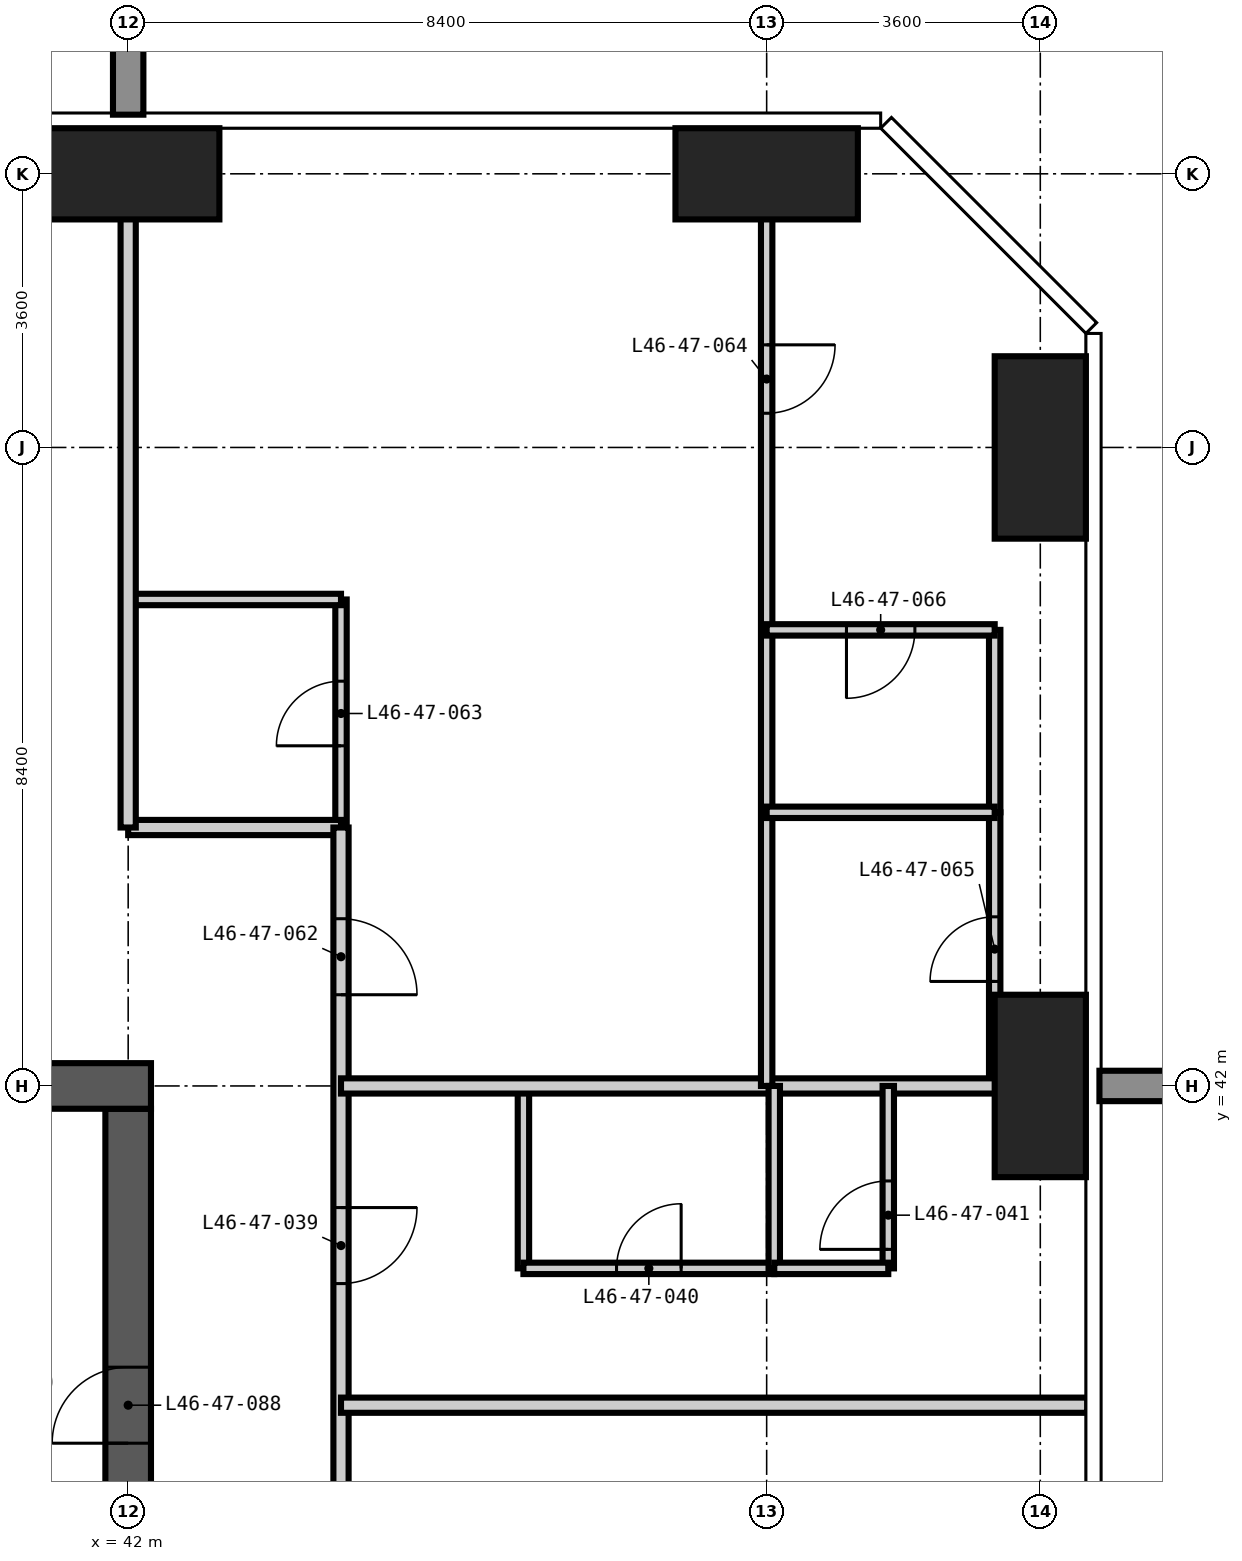
"""IFC4 building model, lengths in metres.
Left out: names, types, materials, properties, quantities, classifications, styles, units other than length and angle.
Written with IfcOpenShell. Run it as: python <this file> out.ifc"""

import sys

from ifc_helpers import new_model, si_unit, direction, frame, frame_2d, origin, origin_2d, place, context, subcontext, project, spatial, rectangle, extrude, element, fill, save


model = new_model("IFC4")
c1 = context("Model", 3, precision=1e-05, world=origin(), true_north=direction((0.0, 1.0)))
c2 = subcontext(c1, "Body", "Model", "MODEL_VIEW")
j1 = project(units=[si_unit("LENGTHUNIT", "METRE"), si_unit("PLANEANGLEUNIT", "RADIAN")], contexts=[c1])
p1 = place(None, origin())
s1 = spatial("IfcSite", under=j1, at=p1, CompositionType="ELEMENT")
p2 = place(p1, origin())
s2 = spatial("IfcBuilding", under=s1, at=p2, CompositionType="ELEMENT")
p3 = place(p2, frame((0.0, 0.0, 180.6)))
s3 = spatial("IfcBuildingStorey", under=s2, at=p3, CompositionType="ELEMENT", Elevation=180.6)
for number, where, z_axis, x_axis in (
    (1, (42.0, 54.0, -0.35), (0.0, 0.0, 1.0), (1.0, 0.0, 0.0)),
    (2, (50.4, 54.0, -0.35), (0.0, 0.0, 1.0), (1.0, 0.0, 0.0)),
):
    element("IfcColumn", number, at=place(p3, frame(where, z_axis=z_axis, x_axis=x_axis)), inside=s3, PredefinedType="COLUMN", context=c2, shape_type="SweptSolid", body=[
        extrude(rectangle(XDim=2.4, YDim=1.2, at=origin_2d()), origin(), (0.0, 0.0, 1.0), 3.6),
    ])
for number, where, z_axis, x_axis in (
    (3, (54.0, 42.0, -0.35), (0.0, 0.0, 1.0), (1.0, 0.0, 0.0)),
    (4, (54.0, 50.4, -0.35), (0.0, 0.0, 1.0), (1.0, 0.0, 0.0)),
):
    element("IfcColumn", number, at=place(p3, frame(where, z_axis=z_axis, x_axis=x_axis)), inside=s3, PredefinedType="COLUMN", context=c2, shape_type="SweptSolid", body=[
        extrude(rectangle(XDim=1.2, YDim=2.4, at=origin_2d()), origin(), (0.0, 0.0, 1.0), 3.6),
    ])
p4 = place(p3, frame((42.0, 17.1, -0.35), z_axis=(0.0, 0.0, 1.0), x_axis=(0.0, 1.0, 0.0)))
e5 = element("IfcWall", 5, at=p4, inside=s3, PredefinedType="SHEAR", context=c2, shape_type="SweptSolid", body=[
    extrude(rectangle(XDim=24.6, YDim=0.6, at=frame_2d((12.3, 0.0))), origin(), (0.0, 0.0, 1.0), 3.6),
])
p5 = place(p4, frame((0.5, 0.0, 0.35)))
e6 = element("IfcOpeningElement", 6, at=p5, cuts=e5, PredefinedType="OPENING", context=c2, shape_type="SweptSolid", body=[
    extrude(rectangle(XDim=1.2, YDim=2.2, at=frame_2d((0.6, 1.1))), frame((0.0, 0.31, 0.0), z_axis=(0.0, -1.0, 0.0), x_axis=(1.0, 0.0, 0.0)), (0.0, 0.0, 1.0), 0.62),
])
p6 = place(p4, frame((11.8, 0.0, 0.35)))
e7 = element("IfcOpeningElement", 7, at=p6, cuts=e5, PredefinedType="OPENING", context=c2, shape_type="SweptSolid", body=[
    extrude(rectangle(XDim=1.0, YDim=2.1, at=frame_2d((0.5, 1.05))), frame((0.0, 0.31, 0.0), z_axis=(0.0, -1.0, 0.0), x_axis=(1.0, 0.0, 0.0)), (0.0, 0.0, 1.0), 0.62),
])
p7 = place(p4, frame((20.2, 0.0, 0.35)))
e8 = element("IfcOpeningElement", 8, at=p7, cuts=e5, PredefinedType="OPENING", context=c2, shape_type="SweptSolid", body=[
    extrude(rectangle(XDim=1.0, YDim=2.1, at=frame_2d((0.5, 1.05))), frame((0.0, 0.31, 0.0), z_axis=(0.0, -1.0, 0.0), x_axis=(1.0, 0.0, 0.0)), (0.0, 0.0, 1.0), 0.62),
])
p8 = place(p3, frame((42.3, 42.0, -0.35), z_axis=(0.0, 0.0, 1.0), x_axis=(-1.0, 0.0, 0.0)))
e9 = element("IfcWall", 9, at=p8, inside=s3, PredefinedType="SHEAR", context=c2, shape_type="SweptSolid", body=[
    extrude(rectangle(XDim=25.8, YDim=0.6, at=frame_2d((12.9, 0.0))), origin(), (0.0, 0.0, 1.0), 3.6),
])
p9 = place(p8, frame((20.8, 0.0, 0.35)))
e10 = element("IfcOpeningElement", 10, at=p9, cuts=e9, PredefinedType="OPENING", context=c2, shape_type="SweptSolid", body=[
    extrude(rectangle(XDim=1.0, YDim=2.1, at=frame_2d((0.5, 1.05))), frame((0.0, 0.31, 0.0), z_axis=(0.0, -1.0, 0.0), x_axis=(1.0, 0.0, 0.0)), (0.0, 0.0, 1.0), 0.62),
])
p10 = place(p8, frame((10.2, 0.0, 0.35)))
e11 = element("IfcOpeningElement", 11, at=p10, cuts=e9, PredefinedType="OPENING", context=c2, shape_type="SweptSolid", body=[
    extrude(rectangle(XDim=1.2, YDim=2.2, at=frame_2d((0.6, 1.1))), frame((0.0, 0.31, 0.0), z_axis=(0.0, -1.0, 0.0), x_axis=(1.0, 0.0, 0.0)), (0.0, 0.0, 1.0), 0.62),
])
p11 = place(p3, frame((44.8, 45.4, 0.0), z_axis=(0.0, 0.0, 1.0), x_axis=(0.0, 1.0, 0.0)))
e12 = element("IfcWall", 12, at=p11, inside=s3, PredefinedType="PARTITIONING", context=c2, shape_type="SweptSolid", body=[
    extrude(rectangle(XDim=3.0, YDim=0.15, at=frame_2d((1.5, 0.0))), origin(), (0.0, 0.0, 1.0), 3.25),
])
p12 = place(p11, frame((1.075, 0.0, 0.0)))
e13 = element("IfcOpeningElement", 13, at=p12, cuts=e12, PredefinedType="OPENING", context=c2, shape_type="SweptSolid", body=[
    extrude(rectangle(XDim=0.85, YDim=2.1, at=frame_2d((0.425, 1.05))), frame((0.0, 0.085, 0.0), z_axis=(0.0, -1.0, 0.0), x_axis=(1.0, 0.0, 0.0)), (0.0, 0.0, 1.0), 0.17),
])
p13 = place(p3, frame((47.2, 39.6, 0.0), z_axis=(0.0, 0.0, 1.0), x_axis=(0.0, 1.0, 0.0)))
e14 = element("IfcWall", 14, at=p13, inside=s3, PredefinedType="PARTITIONING", context=c2, shape_type="SweptSolid", body=[
    extrude(rectangle(XDim=2.4, YDim=0.15, at=frame_2d((1.2, 0.0))), origin(), (0.0, 0.0, 1.0), 3.25),
])
p14 = place(p3, frame((53.4, 42.0, 0.0), z_axis=(0.0, 0.0, 1.0), x_axis=(0.0, 1.0, 0.0)))
e15 = element("IfcWall", 15, at=p14, inside=s3, PredefinedType="PARTITIONING", context=c2, shape_type="SweptSolid", body=[
    extrude(rectangle(XDim=3.6, YDim=0.15, at=frame_2d((1.8, 0.0))), origin(), (0.0, 0.0, 1.0), 3.25),
])
p15 = place(p14, frame((1.375, 0.0, 0.0)))
e16 = element("IfcOpeningElement", 16, at=p15, cuts=e15, PredefinedType="OPENING", context=c2, shape_type="SweptSolid", body=[
    extrude(rectangle(XDim=0.85, YDim=2.1, at=frame_2d((0.425, 1.05))), frame((0.0, 0.085, 0.0), z_axis=(0.0, -1.0, 0.0), x_axis=(1.0, 0.0, 0.0)), (0.0, 0.0, 1.0), 0.17),
])
p16 = place(p3, frame((47.2, 39.6, 0.0), z_axis=(0.0, 0.0, 1.0), x_axis=(1.0, 0.0, 0.0)))
e17 = element("IfcWall", 17, at=p16, inside=s3, PredefinedType="PARTITIONING", context=c2, shape_type="SweptSolid", body=[
    extrude(rectangle(XDim=3.3, YDim=0.15, at=frame_2d((1.65, 0.0))), origin(), (0.0, 0.0, 1.0), 3.25),
])
p17 = place(p16, frame((1.225, 0.0, 0.0)))
e18 = element("IfcOpeningElement", 18, at=p17, cuts=e17, PredefinedType="OPENING", context=c2, shape_type="SweptSolid", body=[
    extrude(rectangle(XDim=0.85, YDim=2.1, at=frame_2d((0.425, 1.05))), frame((0.0, 0.085, 0.0), z_axis=(0.0, -1.0, 0.0), x_axis=(1.0, 0.0, 0.0)), (0.0, 0.0, 1.0), 0.17),
])
p18 = place(p3, frame((42.0, 48.4, 0.0), z_axis=(0.0, 0.0, 1.0), x_axis=(1.0, 0.0, 0.0)))
e19 = element("IfcWall", 19, at=p18, inside=s3, PredefinedType="PARTITIONING", context=c2, shape_type="SweptSolid", body=[
    extrude(rectangle(XDim=2.8, YDim=0.15, at=frame_2d((1.4, 0.0))), origin(), (0.0, 0.0, 1.0), 3.25),
])
p19 = place(p3, frame((42.0, 45.4, 0.0), z_axis=(0.0, 0.0, 1.0), x_axis=(1.0, 0.0, 0.0)))
e20 = element("IfcWall", 20, at=p19, inside=s3, PredefinedType="PARTITIONING", context=c2, shape_type="SweptSolid", body=[
    extrude(rectangle(XDim=2.8, YDim=0.2, at=frame_2d((1.4, 0.0))), origin(), (0.0, 0.0, 1.0), 3.25),
])
p20 = place(p3, frame((42.0, 54.618, 0.0), z_axis=(0.0, 0.0, 1.0), x_axis=(0.0, -1.0, 0.0)))
e21 = element("IfcWall", 21, at=p20, inside=s3, PredefinedType="PARTITIONING", context=c2, shape_type="SweptSolid", body=[
    extrude(rectangle(XDim=9.218, YDim=0.2, at=frame_2d((4.609, 0.0))), origin(), (0.0, 0.0, 1.0), 3.25),
])
p21 = place(p3, frame((44.8, 45.4, 0.0), z_axis=(0.0, 0.0, 1.0), x_axis=(0.0, -1.0, 0.0)))
e22 = element("IfcWall", 22, at=p21, inside=s3, PredefinedType="PARTITIONING", context=c2, shape_type="SweptSolid", body=[
    extrude(rectangle(XDim=30.8, YDim=0.2, at=frame_2d((15.4, 0.0))), origin(), (0.0, 0.0, 1.0), 3.25),
])
p22 = place(p21, frame((26.0, 0.0, 0.0)))
e23 = element("IfcOpeningElement", 23, at=p22, cuts=e22, PredefinedType="OPENING", context=c2, shape_type="SweptSolid", body=[
    extrude(rectangle(XDim=1.0, YDim=2.2, at=frame_2d((0.5, 1.1))), frame((0.0, 0.11, 0.0), z_axis=(0.0, -1.0, 0.0), x_axis=(1.0, 0.0, 0.0)), (0.0, 0.0, 1.0), 0.22),
])
p23 = place(p21, frame((21.8, 0.0, 0.0)))
e24 = element("IfcOpeningElement", 24, at=p23, cuts=e22, PredefinedType="OPENING", context=c2, shape_type="SweptSolid", body=[
    extrude(rectangle(XDim=1.0, YDim=2.2, at=frame_2d((0.5, 1.1))), frame((0.0, 0.11, 0.0), z_axis=(0.0, -1.0, 0.0), x_axis=(1.0, 0.0, 0.0)), (0.0, 0.0, 1.0), 0.22),
])
p24 = place(p21, frame((17.6, 0.0, 0.0)))
e25 = element("IfcOpeningElement", 25, at=p24, cuts=e22, PredefinedType="OPENING", context=c2, shape_type="SweptSolid", body=[
    extrude(rectangle(XDim=1.0, YDim=2.2, at=frame_2d((0.5, 1.1))), frame((0.0, 0.11, 0.0), z_axis=(0.0, -1.0, 0.0), x_axis=(1.0, 0.0, 0.0)), (0.0, 0.0, 1.0), 0.22),
])
p25 = place(p21, frame((13.4, 0.0, 0.0)))
e26 = element("IfcOpeningElement", 26, at=p25, cuts=e22, PredefinedType="OPENING", context=c2, shape_type="SweptSolid", body=[
    extrude(rectangle(XDim=1.0, YDim=2.2, at=frame_2d((0.5, 1.1))), frame((0.0, 0.11, 0.0), z_axis=(0.0, -1.0, 0.0), x_axis=(1.0, 0.0, 0.0)), (0.0, 0.0, 1.0), 0.22),
])
p26 = place(p21, frame((9.2, 0.0, 0.0)))
e27 = element("IfcOpeningElement", 27, at=p26, cuts=e22, PredefinedType="OPENING", context=c2, shape_type="SweptSolid", body=[
    extrude(rectangle(XDim=1.0, YDim=2.2, at=frame_2d((0.5, 1.1))), frame((0.0, 0.11, 0.0), z_axis=(0.0, -1.0, 0.0), x_axis=(1.0, 0.0, 0.0)), (0.0, 0.0, 1.0), 0.22),
])
p27 = place(p21, frame((5.0, 0.0, 0.0)))
e28 = element("IfcOpeningElement", 28, at=p27, cuts=e22, PredefinedType="OPENING", context=c2, shape_type="SweptSolid", body=[
    extrude(rectangle(XDim=1.0, YDim=2.2, at=frame_2d((0.5, 1.1))), frame((0.0, 0.11, 0.0), z_axis=(0.0, -1.0, 0.0), x_axis=(1.0, 0.0, 0.0)), (0.0, 0.0, 1.0), 0.22),
])
p28 = place(p21, frame((29.2, 0.0, 0.0)))
e29 = element("IfcOpeningElement", 29, at=p28, cuts=e22, PredefinedType="OPENING", context=c2, shape_type="SweptSolid", body=[
    extrude(rectangle(XDim=1.0, YDim=2.2, at=frame_2d((0.5, 1.1))), frame((0.0, 0.11, 0.0), z_axis=(0.0, -1.0, 0.0), x_axis=(1.0, 0.0, 0.0)), (0.0, 0.0, 1.0), 0.22),
])
p29 = place(p21, frame((1.2, 0.0, 0.0)))
e30 = element("IfcOpeningElement", 30, at=p29, cuts=e22, PredefinedType="OPENING", context=c2, shape_type="SweptSolid", body=[
    extrude(rectangle(XDim=1.0, YDim=2.2, at=frame_2d((0.5, 1.1))), frame((0.0, 0.11, 0.0), z_axis=(0.0, -1.0, 0.0), x_axis=(1.0, 0.0, 0.0)), (0.0, 0.0, 1.0), 0.22),
])
for number, where, z_axis, x_axis in (
    (31, (44.8, 37.8, 0.0), (0.0, 0.0, 1.0), (1.0, 0.0, 0.0)),
    (32, (44.8, 42.0, 0.0), (0.0, 0.0, 1.0), (1.0, 0.0, 0.0)),
):
    element("IfcWall", number, at=place(p3, frame(where, z_axis=z_axis, x_axis=x_axis)), inside=s3, PredefinedType="PARTITIONING", context=c2, shape_type="SweptSolid", body=[
        extrude(rectangle(XDim=9.818, YDim=0.2, at=frame_2d((4.909, 0.0))), origin(), (0.0, 0.0, 1.0), 3.25),
    ])
p30 = place(p3, frame((50.4, 42.0, 0.0), z_axis=(0.0, 0.0, 1.0), x_axis=(0.0, 1.0, 0.0)))
e33 = element("IfcWall", 33, at=p30, inside=s3, PredefinedType="PARTITIONING", context=c2, shape_type="SweptSolid", body=[
    extrude(rectangle(XDim=12.618, YDim=0.15, at=frame_2d((6.309, 0.0))), origin(), (0.0, 0.0, 1.0), 3.25),
])
p31 = place(p30, frame((8.85, 0.0, 0.0)))
e34 = element("IfcOpeningElement", 34, at=p31, cuts=e33, PredefinedType="OPENING", context=c2, shape_type="SweptSolid", body=[
    extrude(rectangle(XDim=0.9, YDim=2.1, at=frame_2d((0.45, 1.05))), frame((0.0, 0.085, 0.0), z_axis=(0.0, -1.0, 0.0), x_axis=(1.0, 0.0, 0.0)), (0.0, 0.0, 1.0), 0.17),
])
p32 = place(p3, frame((50.5, 39.6, 0.0), z_axis=(0.0, 0.0, 1.0), x_axis=(0.0, 1.0, 0.0)))
e35 = element("IfcWall", 35, at=p32, inside=s3, PredefinedType="PARTITIONING", context=c2, shape_type="SweptSolid", body=[
    extrude(rectangle(XDim=2.4, YDim=0.15, at=frame_2d((1.2, 0.0))), origin(), (0.0, 0.0, 1.0), 3.25),
])
p33 = place(p3, frame((52.0, 39.6, 0.0), z_axis=(0.0, 0.0, 1.0), x_axis=(0.0, 1.0, 0.0)))
e36 = element("IfcWall", 36, at=p33, inside=s3, PredefinedType="PARTITIONING", context=c2, shape_type="SweptSolid", body=[
    extrude(rectangle(XDim=2.4, YDim=0.15, at=frame_2d((1.2, 0.0))), origin(), (0.0, 0.0, 1.0), 3.25),
])
p34 = place(p33, frame((0.25, 0.0, 0.0)))
e37 = element("IfcOpeningElement", 37, at=p34, cuts=e36, PredefinedType="OPENING", context=c2, shape_type="SweptSolid", body=[
    extrude(rectangle(XDim=0.9, YDim=2.1, at=frame_2d((0.45, 1.05))), frame((0.0, 0.085, 0.0), z_axis=(0.0, -1.0, 0.0), x_axis=(1.0, 0.0, 0.0)), (0.0, 0.0, 1.0), 0.17),
])
p35 = place(p3, frame((53.4, 45.6, 0.0), z_axis=(0.0, 0.0, 1.0), x_axis=(0.0, 1.0, 0.0)))
e38 = element("IfcWall", 38, at=p35, inside=s3, PredefinedType="PARTITIONING", context=c2, shape_type="SweptSolid", body=[
    extrude(rectangle(XDim=2.4, YDim=0.15, at=frame_2d((1.2, 0.0))), origin(), (0.0, 0.0, 1.0), 3.25),
])
p36 = place(p3, frame((50.5, 39.6, 0.0), z_axis=(0.0, 0.0, 1.0), x_axis=(1.0, 0.0, 0.0)))
e39 = element("IfcWall", 39, at=p36, inside=s3, PredefinedType="PARTITIONING", context=c2, shape_type="SweptSolid", body=[
    extrude(rectangle(XDim=1.5, YDim=0.15, at=frame_2d((0.75, 0.0))), origin(), (0.0, 0.0, 1.0), 3.25),
])
p37 = place(p3, frame((50.4, 45.6, 0.0), z_axis=(0.0, 0.0, 1.0), x_axis=(1.0, 0.0, 0.0)))
e40 = element("IfcWall", 40, at=p37, inside=s3, PredefinedType="PARTITIONING", context=c2, shape_type="SweptSolid", body=[
    extrude(rectangle(XDim=3.0, YDim=0.15, at=frame_2d((1.5, 0.0))), origin(), (0.0, 0.0, 1.0), 3.25),
])
p38 = place(p3, frame((50.4, 48.0, 0.0), z_axis=(0.0, 0.0, 1.0), x_axis=(1.0, 0.0, 0.0)))
e41 = element("IfcWall", 41, at=p38, inside=s3, PredefinedType="PARTITIONING", context=c2, shape_type="SweptSolid", body=[
    extrude(rectangle(XDim=3.0, YDim=0.15, at=frame_2d((1.5, 0.0))), origin(), (0.0, 0.0, 1.0), 3.25),
])
p39 = place(p38, frame((1.05, 0.0, 0.0)))
e42 = element("IfcOpeningElement", 42, at=p39, cuts=e41, PredefinedType="OPENING", context=c2, shape_type="SweptSolid", body=[
    extrude(rectangle(XDim=0.9, YDim=2.1, at=frame_2d((0.45, 1.05))), frame((0.0, 0.085, 0.0), z_axis=(0.0, -1.0, 0.0), x_axis=(1.0, 0.0, 0.0)), (0.0, 0.0, 1.0), 0.17),
])
p40 = place(p27, origin())
e43 = element("IfcDoor", 43, at=p40, inside=s3, OperationType="SINGLE_SWING_LEFT", PredefinedType="DOOR", context=c2, shape_type="SweptSolid", body=[
    extrude(rectangle(XDim=1.0, YDim=2.2, at=frame_2d((0.5, 1.1))), frame((0.0, 0.025, 0.0), z_axis=(0.0, -1.0, 0.0), x_axis=(1.0, 0.0, 0.0)), (0.0, 0.0, 1.0), 0.05),
])
fill(e28, e43)
p41 = place(p17, origin())
e44 = element("IfcDoor", 44, at=p41, inside=s3, OperationType="SINGLE_SWING_RIGHT", PredefinedType="DOOR", context=c2, shape_type="SweptSolid", body=[
    extrude(rectangle(XDim=0.85, YDim=2.1, at=frame_2d((0.425, 1.05))), frame((0.0, 0.025, 0.0), z_axis=(0.0, -1.0, 0.0), x_axis=(1.0, 0.0, 0.0)), (0.0, 0.0, 1.0), 0.05),
])
fill(e18, e44)
p42 = place(p34, origin())
e45 = element("IfcDoor", 45, at=p42, inside=s3, OperationType="SINGLE_SWING_LEFT", PredefinedType="DOOR", context=c2, shape_type="SweptSolid", body=[
    extrude(rectangle(XDim=0.9, YDim=2.1, at=frame_2d((0.45, 1.05))), frame((0.0, 0.025, 0.0), z_axis=(0.0, -1.0, 0.0), x_axis=(1.0, 0.0, 0.0)), (0.0, 0.0, 1.0), 0.05),
])
fill(e37, e45)
p43 = place(p29, origin())
e46 = element("IfcDoor", 46, at=p43, inside=s3, OperationType="SINGLE_SWING_RIGHT", PredefinedType="DOOR", context=c2, shape_type="SweptSolid", body=[
    extrude(rectangle(XDim=1.0, YDim=2.2, at=frame_2d((0.5, 1.1))), frame((0.0, 0.025, 0.0), z_axis=(0.0, -1.0, 0.0), x_axis=(1.0, 0.0, 0.0)), (0.0, 0.0, 1.0), 0.05),
])
fill(e30, e46)
p44 = place(p12, origin())
e47 = element("IfcDoor", 47, at=p44, inside=s3, OperationType="SINGLE_SWING_LEFT", PredefinedType="DOOR", context=c2, shape_type="SweptSolid", body=[
    extrude(rectangle(XDim=0.85, YDim=2.1, at=frame_2d((0.425, 1.05))), frame((0.0, 0.025, 0.0), z_axis=(0.0, -1.0, 0.0), x_axis=(1.0, 0.0, 0.0)), (0.0, 0.0, 1.0), 0.05),
])
fill(e13, e47)
p45 = place(p31, frame((0.9, 0.0, 0.0), z_axis=(0.0, 0.0, 1.0), x_axis=(-1.0, 0.0, 0.0)))
e48 = element("IfcDoor", 48, at=p45, inside=s3, OperationType="SINGLE_SWING_LEFT", PredefinedType="DOOR", context=c2, shape_type="SweptSolid", body=[
    extrude(rectangle(XDim=0.9, YDim=2.1, at=frame_2d((0.45, 1.05))), frame((0.0, 0.025, 0.0), z_axis=(0.0, -1.0, 0.0), x_axis=(1.0, 0.0, 0.0)), (0.0, 0.0, 1.0), 0.05),
])
fill(e34, e48)
p46 = place(p15, origin())
e49 = element("IfcDoor", 49, at=p46, inside=s3, OperationType="SINGLE_SWING_LEFT", PredefinedType="DOOR", context=c2, shape_type="SweptSolid", body=[
    extrude(rectangle(XDim=0.85, YDim=2.1, at=frame_2d((0.425, 1.05))), frame((0.0, 0.025, 0.0), z_axis=(0.0, -1.0, 0.0), x_axis=(1.0, 0.0, 0.0)), (0.0, 0.0, 1.0), 0.05),
])
fill(e16, e49)
p47 = place(p39, frame((0.9, 0.0, 0.0), z_axis=(0.0, 0.0, 1.0), x_axis=(-1.0, 0.0, 0.0)))
e50 = element("IfcDoor", 50, at=p47, inside=s3, OperationType="SINGLE_SWING_RIGHT", PredefinedType="DOOR", context=c2, shape_type="SweptSolid", body=[
    extrude(rectangle(XDim=0.9, YDim=2.1, at=frame_2d((0.45, 1.05))), frame((0.0, 0.025, 0.0), z_axis=(0.0, -1.0, 0.0), x_axis=(1.0, 0.0, 0.0)), (0.0, 0.0, 1.0), 0.05),
])
fill(e42, e50)
p48 = place(p7, origin())
e51 = element("IfcDoor", 51, at=p48, inside=s3, OperationType="SINGLE_SWING_LEFT", PredefinedType="DOOR", context=c2, shape_type="SweptSolid", body=[
    extrude(rectangle(XDim=1.0, YDim=2.1, at=frame_2d((0.5, 1.05))), frame((0.0, 0.025, 0.0), z_axis=(0.0, -1.0, 0.0), x_axis=(1.0, 0.0, 0.0)), (0.0, 0.0, 1.0), 0.05),
])
fill(e8, e51)
save(model, sys.argv[1])
